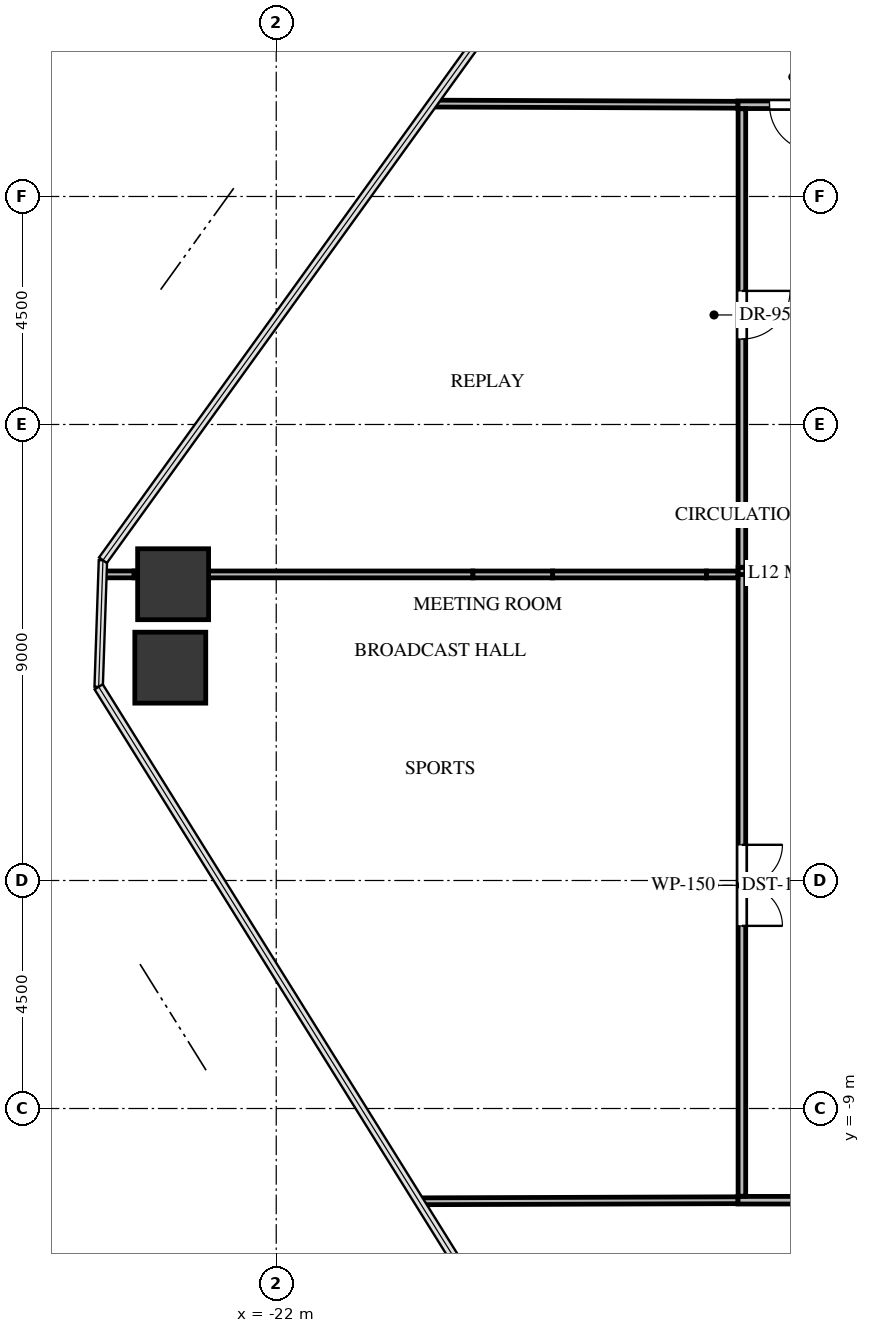
"""IFC4 building model, lengths in metres.
Left out: names, types, materials, properties, quantities, classifications, styles, units other than length and angle.
Written with IfcOpenShell. Run it as: python <this file> out.ifc"""

import sys

from ifc_helpers import new_model, si_unit, direction, frame, frame_2d, origin, origin_2d, place, context, subcontext, project, spatial, rectangle, extrude, source, transform, mapped, element, fill, save


model = new_model("IFC4")
c1 = context("Model", 3, precision=1e-05, world=origin(), true_north=direction((0.0, 1.0)))
c2 = subcontext(c1, "Body", "Model", "MODEL_VIEW")
j1 = project(units=[si_unit("LENGTHUNIT", "METRE"), si_unit("PLANEANGLEUNIT", "RADIAN")], contexts=[c1])
p1 = place(None, origin())
s1 = spatial("IfcSite", under=j1, at=p1, CompositionType="ELEMENT")
p2 = place(p1, origin())
s2 = spatial("IfcBuilding", under=s1, at=p2, CompositionType="ELEMENT")
p3 = place(p2, frame((0.0, 0.0, 52.2)))
s3 = spatial("IfcBuildingStorey", under=s2, at=p3, CompositionType="ELEMENT", Elevation=52.2)
m1 = source(origin(), c2, "Body", "SweptSolid", [
    extrude(rectangle(XDim=1.4, YDim=1.4, at=origin_2d()), origin(), (0.0, 0.0, 1.0), 3.3),
])
for number, where, z_axis, x_axis in (
    (1, (-24.091, -0.3, -0.24), (0.0, 0.0, 1.0), (1.0, 0.0, 0.0)),
    (2, (-24.035, 1.347, -0.24), (0.0, 0.0, 1.0), (1.0, 0.0, 0.0)),
):
    element("IfcColumn", number, at=place(p3, frame(where, z_axis=z_axis, x_axis=x_axis)), inside=s3, PredefinedType="COLUMN", context=c2, shape_type="MappedRepresentation", body=[
        mapped(m1, transform((0.0, 0.0, 0.0), x_axis=(1.0, 0.0, 0.0), y_axis=(0.0, 1.0, 0.0), z_axis=(0.0, 0.0, 1.0), scale=1.0)),
    ])
p4 = place(p3, frame((-10.72, 10.81, 0.0), z_axis=(0.0, 0.0, 1.0), x_axis=(-1.0, 0.0, 0.0)))
e3 = element("IfcWall", 3, at=p4, inside=s3, PredefinedType="PARTITIONING", context=c2, shape_type="SweptSolid", body=[
    extrude(rectangle(XDim=2.17, YDim=0.15, at=frame_2d((1.085, 0.0))), origin(), (0.0, 0.0, 1.0), 3.045),
])
p5 = place(p4, frame((0.625, 0.0, 0.0)))
e4 = element("IfcOpeningElement", 4, at=p5, cuts=e3, PredefinedType="OPENING", context=c2, shape_type="SweptSolid", body=[
    extrude(rectangle(XDim=0.92, YDim=2.1, at=frame_2d((0.46, 1.05))), frame((0.0, 0.085, 0.0), z_axis=(0.0, -1.0, 0.0), x_axis=(1.0, 0.0, 0.0)), (0.0, 0.0, 1.0), 0.17),
])
p6 = place(p3, frame((-12.89, -10.81, 0.0), z_axis=(0.0, 0.0, 1.0), x_axis=(1.0, 0.0, 0.0)))
e5 = element("IfcWall", 5, at=p6, inside=s3, PredefinedType="PARTITIONING", context=c2, shape_type="SweptSolid", body=[
    extrude(rectangle(XDim=5.43, YDim=0.15, at=frame_2d((2.715, 0.0))), origin(), (0.0, 0.0, 1.0), 3.045),
])
p7 = place(p6, frame((2.255, 0.0, 0.0)))
e6 = element("IfcOpeningElement", 6, at=p7, cuts=e5, PredefinedType="OPENING", context=c2, shape_type="SweptSolid", body=[
    extrude(rectangle(XDim=0.92, YDim=2.1, at=frame_2d((0.46, 1.05))), frame((0.0, 0.085, 0.0), z_axis=(0.0, -1.0, 0.0), x_axis=(1.0, 0.0, 0.0)), (0.0, 0.0, 1.0), 0.17),
])
p8 = place(p3, frame((-12.81, 1.54, 0.0), z_axis=(0.0, 0.0, 1.0), x_axis=(0.0, -1.0, 0.0)))
e7 = element("IfcWall", 7, at=p8, inside=s3, PredefinedType="PARTITIONING", context=c2, shape_type="SweptSolid", body=[
    extrude(rectangle(XDim=12.271, YDim=0.15, at=frame_2d((6.135, 0.0))), origin(), (0.0, 0.0, 1.0), 3.045),
])
p9 = place(p8, frame((5.335, 0.0, 0.0)))
e8 = element("IfcOpeningElement", 8, at=p9, cuts=e7, PredefinedType="OPENING", context=c2, shape_type="SweptSolid", body=[
    extrude(rectangle(XDim=1.6, YDim=2.15, at=frame_2d((0.8, 1.075))), frame((0.0, 0.085, 0.0), z_axis=(0.0, -1.0, 0.0), x_axis=(1.0, 0.0, 0.0)), (0.0, 0.0, 1.0), 0.17),
])
p10 = place(p3, frame((-12.81, 10.731, 0.0), z_axis=(0.0, 0.0, 1.0), x_axis=(0.0, -1.0, 0.0)))
e9 = element("IfcWall", 9, at=p10, inside=s3, PredefinedType="PARTITIONING", context=c2, shape_type="SweptSolid", body=[
    extrude(rectangle(XDim=8.139, YDim=0.15, at=frame_2d((4.069, 0.0))), origin(), (0.0, 0.0, 1.0), 3.045),
])
p11 = place(p10, frame((3.594, 0.0, 0.0)))
e10 = element("IfcOpeningElement", 10, at=p11, cuts=e9, PredefinedType="OPENING", context=c2, shape_type="SweptSolid", body=[
    extrude(rectangle(XDim=0.95, YDim=2.1, at=frame_2d((0.475, 1.05))), frame((0.0, 0.085, 0.0), z_axis=(0.0, -1.0, 0.0), x_axis=(1.0, 0.0, 0.0)), (0.0, 0.0, 1.0), 0.17),
])
p12 = place(p3, frame((-12.81, 1.682, 0.0), z_axis=(0.0, 0.0, 1.0), x_axis=(0.0, -1.0, 0.0)))
e11 = element("IfcWall", 11, at=p12, inside=s3, PredefinedType="PARTITIONING", context=c2, shape_type="SweptSolid", body=[
    extrude(rectangle(XDim=0.142, YDim=0.15, at=frame_2d((0.071, 0.0))), origin(), (0.0, 0.0, 1.0), 3.045),
])
p13 = place(p3, frame((-12.81, 2.592, 0.0), z_axis=(0.0, 0.0, 1.0), x_axis=(0.0, -1.0, 0.0)))
e12 = element("IfcWall", 12, at=p13, inside=s3, PredefinedType="PARTITIONING", context=c2, shape_type="SweptSolid", body=[
    extrude(rectangle(XDim=0.91, YDim=0.15, at=frame_2d((0.455, 0.0))), origin(), (0.0, 0.0, 1.0), 2.13),
])
p14 = place(p3, frame((-12.89, 10.81, 0.0), z_axis=(0.0, 0.0, 1.0), x_axis=(-0.999992607823, 0.003845035728, 0.0)))
e13 = element("IfcWall", 13, at=p14, inside=s3, PredefinedType="PARTITIONING", context=c2, shape_type="SweptSolid", body=[
    extrude(rectangle(XDim=6.032, YDim=0.135, at=frame_2d((3.016, 0.0))), origin(), (0.0, 0.0, 1.0), 2.38),
])
p15 = place(p3, frame((-19.182, -10.831, 0.0), z_axis=(0.0, 0.0, 1.0), x_axis=(0.999994432845, 0.003336806783, 0.0)))
e14 = element("IfcWall", 14, at=p15, inside=s3, PredefinedType="PARTITIONING", context=c2, shape_type="SweptSolid", body=[
    extrude(rectangle(XDim=6.292, YDim=0.135, at=frame_2d((3.146, 0.0))), origin(), (0.0, 0.0, 1.0), 2.38),
])
p16 = place(p3, frame((-25.429, 1.542, 0.0), z_axis=(0.0, 0.0, 1.0), x_axis=(0.999999923706, -0.00039062497, 0.0)))
e15 = element("IfcWall", 15, at=p16, inside=s3, PredefinedType="PARTITIONING", context=c2, shape_type="SweptSolid", body=[
    extrude(rectangle(XDim=0.625, YDim=0.135, at=frame_2d((0.312, 0.0))), origin(), (0.0, 0.0, 1.0), 1.877),
])
p17 = place(p3, frame((-18.121, 1.541, 0.0), z_axis=(0.0, 0.0, 1.0), x_axis=(0.999999988, -0.000154918666, 0.0)))
e16 = element("IfcWall", 16, at=p17, inside=s3, PredefinedType="PARTITIONING", context=c2, shape_type="SweptSolid", body=[
    extrude(rectangle(XDim=1.576, YDim=0.135, at=frame_2d((0.788, 0.0))), origin(), (0.0, 0.0, 1.0), 2.13),
])
p18 = place(p3, frame((-13.51, 1.54, 0.0), z_axis=(0.0, 0.0, 1.0), x_axis=(1.0, 0.0, 0.0)))
e17 = element("IfcWall", 17, at=p18, inside=s3, PredefinedType="PARTITIONING", context=c2, shape_type="SweptSolid", body=[
    extrude(rectangle(XDim=0.622, YDim=0.135, at=frame_2d((0.311, 0.0))), origin(), (0.0, 0.0, 1.0), 2.13),
])
p19 = place(p3, frame((-24.804, 1.541, 0.0), z_axis=(0.0, 0.0, 1.0), x_axis=(0.999999993996, -0.000109585037, 0.0)))
e18 = element("IfcWall", 18, at=p19, inside=s3, PredefinedType="PARTITIONING", context=c2, shape_type="SweptSolid", body=[
    extrude(rectangle(XDim=6.684, YDim=0.135, at=frame_2d((3.342, 0.0))), origin(), (0.0, 0.0, 1.0), 1.877),
])
p20 = place(p3, frame((-16.545, 1.54, 0.0), z_axis=(0.0, 0.0, 1.0), x_axis=(0.999999996763, -8.0463469e-05, 0.0)))
e19 = element("IfcWall", 19, at=p20, inside=s3, PredefinedType="PARTITIONING", context=c2, shape_type="SweptSolid", body=[
    extrude(rectangle(XDim=3.034, YDim=0.135, at=frame_2d((1.517, 0.0))), origin(), (0.0, 0.0, 1.0), 2.13),
])
m2 = source(origin(), c2, "Body", "SweptSolid", [
    extrude(rectangle(XDim=0.92, YDim=2.1, at=frame_2d((0.46, 1.05))), frame((0.0, 0.025, 0.0), z_axis=(0.0, -1.0, 0.0), x_axis=(1.0, 0.0, 0.0)), (0.0, 0.0, 1.0), 0.05),
])
p21 = place(p5, origin())
e20 = element("IfcDoor", 20, at=p21, inside=s3, OperationType="SINGLE_SWING_LEFT", PredefinedType="DOOR", context=c2, shape_type="MappedRepresentation", body=[
    mapped(m2, transform((0.0, 0.0, 0.0), x_axis=(1.0, 0.0, 0.0), y_axis=(0.0, 1.0, 0.0), z_axis=(0.0, 0.0, 1.0), scale=1.0)),
])
fill(e4, e20)
m3 = source(origin(), c2, "Body", "SweptSolid", [
    extrude(rectangle(XDim=1.6, YDim=2.15, at=frame_2d((0.8, 1.075))), frame((0.0, 0.025, 0.0), z_axis=(0.0, -1.0, 0.0), x_axis=(1.0, 0.0, 0.0)), (0.0, 0.0, 1.0), 0.05),
])
p22 = place(p9, origin())
e21 = element("IfcDoor", 21, at=p22, inside=s3, OperationType="DOUBLE_DOOR_SINGLE_SWING", PredefinedType="DOOR", context=c2, shape_type="MappedRepresentation", body=[
    mapped(m3, transform((0.0, 0.0, 0.0), x_axis=(1.0, 0.0, 0.0), y_axis=(0.0, 1.0, 0.0), z_axis=(0.0, 0.0, 1.0), scale=1.0)),
])
fill(e8, e21)
m4 = source(origin(), c2, "Body", "SweptSolid", [
    extrude(rectangle(XDim=0.95, YDim=2.1, at=frame_2d((0.475, 1.05))), frame((0.0, 0.025, 0.0), z_axis=(0.0, -1.0, 0.0), x_axis=(1.0, 0.0, 0.0)), (0.0, 0.0, 1.0), 0.05),
])
p23 = place(p11, origin())
e22 = element("IfcDoor", 22, at=p23, inside=s3, OperationType="SINGLE_SWING_LEFT", PredefinedType="DOOR", context=c2, shape_type="MappedRepresentation", body=[
    mapped(m4, transform((0.0, 0.0, 0.0), x_axis=(1.0, 0.0, 0.0), y_axis=(0.0, 1.0, 0.0), z_axis=(0.0, 0.0, 1.0), scale=1.0)),
])
fill(e10, e22)
save(model, sys.argv[1])
